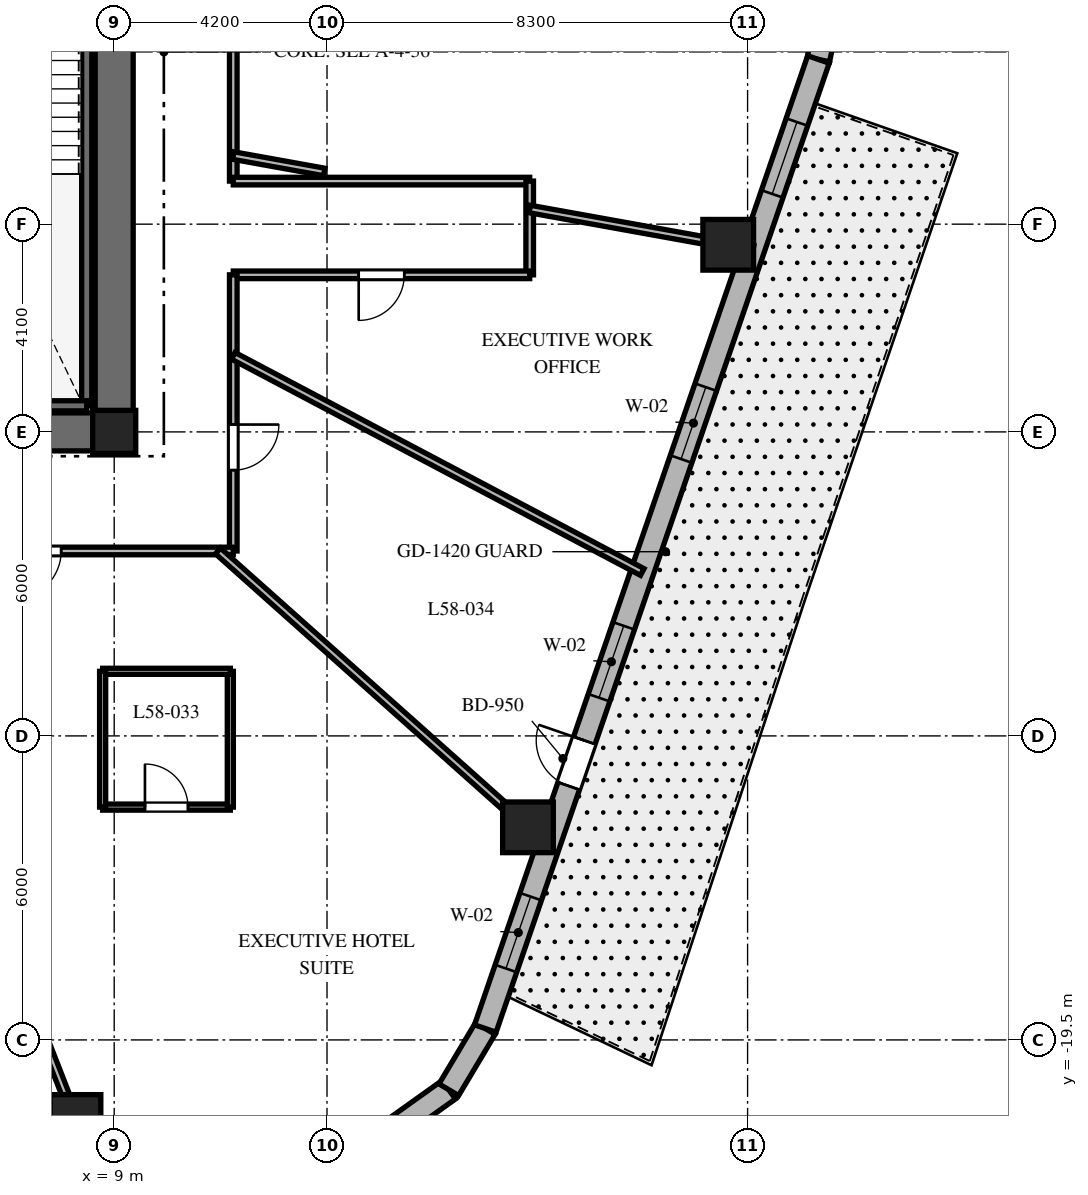
"""IFC4 building model, lengths in metres.
Left out: names, types, materials, properties, quantities, classifications, styles, units other than length and angle.
Written with IfcOpenShell. Run it as: python <this file> out.ifc"""

import sys

from ifc_helpers import new_model, si_unit, direction, frame, frame_2d, origin, origin_2d, place, context, subcontext, project, spatial, rectangle, extrude, element, fill, save


model = new_model("IFC4")
c1 = context("Model", 3, precision=1e-05, world=origin(), true_north=direction((0.0, 1.0)))
c2 = subcontext(c1, "Body", "Model", "MODEL_VIEW")
j1 = project(units=[si_unit("LENGTHUNIT", "METRE"), si_unit("PLANEANGLEUNIT", "RADIAN")], contexts=[c1])
p1 = place(None, origin())
s1 = spatial("IfcSite", under=j1, at=p1, CompositionType="ELEMENT")
p2 = place(p1, origin())
s2 = spatial("IfcBuilding", under=s1, at=p2, CompositionType="ELEMENT")
p3 = place(p2, frame((0.0, 0.0, 233.1)))
s3 = spatial("IfcBuildingStorey", under=s2, at=p3, CompositionType="ELEMENT", Elevation=233.1)
p4 = place(p3, frame((-9.375, -7.5, 0.0), z_axis=(0.0, 0.0, 1.0), x_axis=(1.0, 0.0, 0.0)))
e1 = element("IfcWall", 1, at=p4, inside=s3, PredefinedType="SHEAR", context=c2, shape_type="SweptSolid", body=[
    extrude(rectangle(XDim=18.75, YDim=0.75, at=frame_2d((9.375, 0.0))), origin(), (0.0, 0.0, 1.0), 3.8),
])
p5 = place(p4, frame((9.425, 0.0, 0.0)))
e2 = element("IfcOpeningElement", 2, at=p5, cuts=e1, PredefinedType="OPENING", context=c2, shape_type="SweptSolid", body=[
    extrude(rectangle(XDim=1.0, YDim=2.15, at=frame_2d((0.5, 1.075))), frame((0.0, 0.385, 0.0), z_axis=(0.0, -1.0, 0.0), x_axis=(1.0, 0.0, 0.0)), (0.0, 0.0, 1.0), 0.77),
])
p6 = place(p3, frame((9.0, -7.125, 0.0), z_axis=(0.0, 0.0, 1.0), x_axis=(0.0, 1.0, 0.0)))
e3 = element("IfcWall", 3, at=p6, inside=s3, PredefinedType="SHEAR", context=c2, shape_type="SweptSolid", body=[
    extrude(rectangle(XDim=14.25, YDim=0.75, at=frame_2d((7.125, 0.0))), origin(), (0.0, 0.0, 1.0), 3.8),
])
p7 = place(p6, frame((10.25, 0.0, 0.0)))
e4 = element("IfcOpeningElement", 4, at=p7, cuts=e3, PredefinedType="OPENING", context=c2, shape_type="SweptSolid", body=[
    extrude(rectangle(XDim=1.05, YDim=2.15, at=frame_2d((0.525, 1.075))), frame((0.0, 0.385, 0.0), z_axis=(0.0, -1.0, 0.0), x_axis=(1.0, 0.0, 0.0)), (0.0, 0.0, 1.0), 0.77),
])
p8 = place(p3, frame((8.458, -6.985, 0.0), z_axis=(0.0, 0.0, 1.0), x_axis=(0.0, 1.0, 0.0)))
e5 = element("IfcWall", 5, at=p8, inside=s3, PredefinedType="SHEAR", context=c2, shape_type="SweptSolid", body=[
    extrude(rectangle(XDim=9.143, YDim=0.2, at=frame_2d((4.572, 0.0))), origin(), (0.0, 0.0, 1.0), 3.8),
])
p9 = place(p3, frame((4.772, -6.985, 0.0), z_axis=(0.0, 0.0, 1.0), x_axis=(1.0, 0.0, 0.0)))
e6 = element("IfcWall", 6, at=p9, inside=s3, PredefinedType="SHEAR", context=c2, shape_type="SweptSolid", body=[
    extrude(rectangle(XDim=3.686, YDim=0.2, at=frame_2d((1.843, 0.0))), origin(), (0.0, 0.0, 1.0), 3.8),
])
p10 = place(p3, frame((9.0, -7.5, 0.0), z_axis=(0.0, 0.0, 1.0), x_axis=(1.0, 0.0, 0.0)))
e7 = element("IfcColumn", 7, at=p10, inside=s3, PredefinedType="COLUMN", context=c2, shape_type="SweptSolid", body=[
    extrude(rectangle(XDim=0.85, YDim=0.85, at=origin_2d()), origin(), (0.0, 0.0, 1.0), 3.8),
])
for number, where, z_axis, x_axis in (
    (8, (8.236, -21.08, 0.0), (0.0, 0.0, 1.0), (1.0, 0.0, 0.0)),
    (9, (17.166, -15.304, 0.0), (0.0, 0.0, 1.0), (1.0, 0.0, 0.0)),
    (10, (21.118, -3.807, 0.0), (0.0, 0.0, 1.0), (1.0, 0.0, 0.0)),
):
    element("IfcColumn", number, at=place(p3, frame(where, z_axis=z_axis, x_axis=x_axis)), inside=s3, PredefinedType="COLUMN", context=c2, shape_type="SweptSolid", body=[
        extrude(rectangle(XDim=1.0, YDim=1.0, at=origin_2d()), origin(), (0.0, 0.0, 1.0), 3.8),
    ])
p11 = place(p3, frame((14.478, -21.287, 0.0), z_axis=(0.0, 0.0, 1.0), x_axis=(0.813888518617, 0.58102106611, 0.0)))
e11 = element("IfcWall", 11, at=p11, inside=s3, PredefinedType="SOLIDWALL", context=c2, shape_type="SweptSolid", body=[
    extrude(rectangle(XDim=1.383, YDim=0.45, at=frame_2d((0.691, 0.0))), origin(), (0.0, 0.0, 1.0), 3.5),
])
p12 = place(p3, frame((15.604, -20.483, 0.0), z_axis=(0.0, 0.0, 1.0), x_axis=(0.512222149036, 0.858852996756, 0.0)))
e12 = element("IfcWall", 12, at=p12, inside=s3, PredefinedType="SOLIDWALL", context=c2, shape_type="SweptSolid", body=[
    extrude(rectangle(XDim=1.406, YDim=0.45, at=frame_2d((0.703, 0.0))), origin(), (0.0, 0.0, 1.0), 3.5),
])
p13 = place(p3, frame((22.898, -0.15, 0.0), z_axis=(0.0, 0.0, 1.0), x_axis=(0.199055826889, 0.979988151858, 0.0)))
e13 = element("IfcWall", 13, at=p13, inside=s3, PredefinedType="SOLIDWALL", context=c2, shape_type="SweptSolid", body=[
    extrude(rectangle(XDim=0.894, YDim=0.45, at=frame_2d((0.447, 0.0))), origin(), (0.0, 0.0, 1.0), 3.5),
])
p14 = place(p3, frame((16.324, -19.275, 0.0), z_axis=(0.0, 0.0, 1.0), x_axis=(0.325083142304, 0.945685439557, 0.0)))
e14 = element("IfcWall", 14, at=p14, inside=s3, PredefinedType="SOLIDWALL", context=c2, shape_type="SweptSolid", body=[
    extrude(rectangle(XDim=20.224, YDim=0.45, at=frame_2d((10.112, 0.0))), origin(), (0.0, 0.0, 1.0), 3.5),
])
p15 = place(p14, frame((5.062, 0.0, 0.0)))
e15 = element("IfcOpeningElement", 15, at=p15, cuts=e14, PredefinedType="OPENING", context=c2, shape_type="SweptSolid", body=[
    extrude(rectangle(XDim=0.95, YDim=2.15, at=frame_2d((0.475, 1.075))), frame((0.0, 0.235, 0.0), z_axis=(0.0, -1.0, 0.0), x_axis=(1.0, 0.0, 0.0)), (0.0, 0.0, 1.0), 0.47),
])
p16 = place(p14, frame((1.253, 0.0, 0.8)))
e16 = element("IfcOpeningElement", 16, at=p16, cuts=e14, PredefinedType="OPENING", context=c2, shape_type="SweptSolid", body=[
    extrude(rectangle(XDim=1.5, YDim=1.8, at=frame_2d((0.75, 0.9))), frame((0.0, 0.235, 0.0), z_axis=(0.0, -1.0, 0.0), x_axis=(1.0, 0.0, 0.0)), (0.0, 0.0, 1.0), 0.47),
])
p17 = place(p14, frame((6.904, 0.0, 0.8)))
e17 = element("IfcOpeningElement", 17, at=p17, cuts=e14, PredefinedType="OPENING", context=c2, shape_type="SweptSolid", body=[
    extrude(rectangle(XDim=1.5, YDim=1.8, at=frame_2d((0.75, 0.9))), frame((0.0, 0.235, 0.0), z_axis=(0.0, -1.0, 0.0), x_axis=(1.0, 0.0, 0.0)), (0.0, 0.0, 1.0), 0.47),
])
p18 = place(p14, frame((11.885, 0.0, 0.8)))
e18 = element("IfcOpeningElement", 18, at=p18, cuts=e14, PredefinedType="OPENING", context=c2, shape_type="SweptSolid", body=[
    extrude(rectangle(XDim=1.5, YDim=1.8, at=frame_2d((0.75, 0.9))), frame((0.0, 0.235, 0.0), z_axis=(0.0, -1.0, 0.0), x_axis=(1.0, 0.0, 0.0)), (0.0, 0.0, 1.0), 0.47),
])
p19 = place(p14, frame((17.418, 0.0, 0.8)))
e19 = element("IfcOpeningElement", 19, at=p19, cuts=e14, PredefinedType="OPENING", context=c2, shape_type="SweptSolid", body=[
    extrude(rectangle(XDim=1.5, YDim=1.8, at=frame_2d((0.75, 0.9))), frame((0.0, 0.235, 0.0), z_axis=(0.0, -1.0, 0.0), x_axis=(1.0, 0.0, 0.0)), (0.0, 0.0, 1.0), 0.47),
])
p20 = place(p3, frame((11.35, 9.85, 0.0), z_axis=(0.0, 0.0, 1.0), x_axis=(0.0, -1.0, 0.0)))
e20 = element("IfcWall", 20, at=p20, inside=s3, PredefinedType="PARTITIONING", context=c2, shape_type="SweptSolid", body=[
    extrude(rectangle(XDim=12.4, YDim=0.15, at=frame_2d((6.2, 0.0))), origin(), (0.0, 0.0, 1.0), 2.99),
])
p21 = place(p20, frame((4.191, 0.0, 0.0)))
e21 = element("IfcOpeningElement", 21, at=p21, cuts=e20, PredefinedType="OPENING", context=c2, shape_type="SweptSolid", body=[
    extrude(rectangle(XDim=0.95, YDim=2.03, at=frame_2d((0.475, 1.015))), frame((0.0, 0.085, 0.0), z_axis=(0.0, -1.0, 0.0), x_axis=(1.0, 0.0, 0.0)), (0.0, 0.0, 1.0), 0.17),
])
p22 = place(p20, frame((0.994, 0.0, 0.0)))
e22 = element("IfcOpeningElement", 22, at=p22, cuts=e20, PredefinedType="OPENING", context=c2, shape_type="SweptSolid", body=[
    extrude(rectangle(XDim=0.9, YDim=2.03, at=frame_2d((0.45, 1.015))), frame((0.0, 0.085, 0.0), z_axis=(0.0, -1.0, 0.0), x_axis=(1.0, 0.0, 0.0)), (0.0, 0.0, 1.0), 0.17),
])
p23 = place(p20, frame((8.835, 0.0, 0.0)))
e23 = element("IfcOpeningElement", 23, at=p23, cuts=e20, PredefinedType="OPENING", context=c2, shape_type="SweptSolid", body=[
    extrude(rectangle(XDim=0.95, YDim=2.03, at=frame_2d((0.475, 1.015))), frame((0.0, 0.085, 0.0), z_axis=(0.0, -1.0, 0.0), x_axis=(1.0, 0.0, 0.0)), (0.0, 0.0, 1.0), 0.17),
])
p24 = place(p3, frame((11.35, -2.55, 0.0), z_axis=(0.0, 0.0, 1.0), x_axis=(1.0, 0.0, 0.0)))
e24 = element("IfcWall", 24, at=p24, inside=s3, PredefinedType="PARTITIONING", context=c2, shape_type="SweptSolid", body=[
    extrude(rectangle(XDim=5.85, YDim=0.15, at=frame_2d((2.925, 0.0))), origin(), (0.0, 0.0, 1.0), 2.94),
])
p25 = place(p3, frame((17.2, -2.55, 0.0), z_axis=(0.0, 0.0, 1.0), x_axis=(0.0, -1.0, 0.0)))
e25 = element("IfcWall", 25, at=p25, inside=s3, PredefinedType="PARTITIONING", context=c2, shape_type="SweptSolid", body=[
    extrude(rectangle(XDim=1.85, YDim=0.15, at=frame_2d((0.925, 0.0))), origin(), (0.0, 0.0, 1.0), 2.94),
])
p26 = place(p3, frame((17.2, -4.4, 0.0), z_axis=(0.0, 0.0, 1.0), x_axis=(-1.0, 0.0, 0.0)))
e26 = element("IfcWall", 26, at=p26, inside=s3, PredefinedType="PARTITIONING", context=c2, shape_type="SweptSolid", body=[
    extrude(rectangle(XDim=5.85, YDim=0.15, at=frame_2d((2.925, 0.0))), origin(), (0.0, 0.0, 1.0), 2.94),
])
p27 = place(p26, frame((2.475, 0.0, 0.0)))
e27 = element("IfcOpeningElement", 27, at=p27, cuts=e26, PredefinedType="OPENING", context=c2, shape_type="SweptSolid", body=[
    extrude(rectangle(XDim=0.9, YDim=2.03, at=frame_2d((0.45, 1.015))), frame((0.0, 0.085, 0.0), z_axis=(0.0, -1.0, 0.0), x_axis=(1.0, 0.0, 0.0)), (0.0, 0.0, 1.0), 0.17),
])
p28 = place(p3, frame((11.35, -4.4, 0.0), z_axis=(0.0, 0.0, 1.0), x_axis=(0.0, -1.0, 0.0)))
e28 = element("IfcWall", 28, at=p28, inside=s3, PredefinedType="PARTITIONING", context=c2, shape_type="SweptSolid", body=[
    extrude(rectangle(XDim=5.45, YDim=0.15, at=frame_2d((2.725, 0.0))), origin(), (0.0, 0.0, 1.0), 2.99),
])
p29 = place(p28, frame((2.955, 0.0, 0.0)))
e29 = element("IfcOpeningElement", 29, at=p29, cuts=e28, PredefinedType="OPENING", context=c2, shape_type="SweptSolid", body=[
    extrude(rectangle(XDim=0.9, YDim=2.03, at=frame_2d((0.45, 1.015))), frame((0.0, 0.085, 0.0), z_axis=(0.0, -1.0, 0.0), x_axis=(1.0, 0.0, 0.0)), (0.0, 0.0, 1.0), 0.17),
])
p30 = place(p3, frame((11.35, -9.85, 0.0), z_axis=(0.0, 0.0, 1.0), x_axis=(-1.0, 0.0, 0.0)))
e30 = element("IfcWall", 30, at=p30, inside=s3, PredefinedType="PARTITIONING", context=c2, shape_type="SweptSolid", body=[
    extrude(rectangle(XDim=10.43, YDim=0.15, at=frame_2d((5.215, 0.0))), origin(), (0.0, 0.0, 1.0), 2.99),
])
p31 = place(p30, frame((8.362, 0.0, 0.0)))
e31 = element("IfcOpeningElement", 31, at=p31, cuts=e30, PredefinedType="OPENING", context=c2, shape_type="SweptSolid", body=[
    extrude(rectangle(XDim=0.95, YDim=2.03, at=frame_2d((0.475, 1.015))), frame((0.0, 0.085, 0.0), z_axis=(0.0, -1.0, 0.0), x_axis=(1.0, 0.0, 0.0)), (0.0, 0.0, 1.0), 0.17),
])
p32 = place(p30, frame((3.396, 0.0, 0.0)))
e32 = element("IfcOpeningElement", 32, at=p32, cuts=e30, PredefinedType="OPENING", context=c2, shape_type="SweptSolid", body=[
    extrude(rectangle(XDim=0.95, YDim=2.03, at=frame_2d((0.475, 1.015))), frame((0.0, 0.085, 0.0), z_axis=(0.0, -1.0, 0.0), x_axis=(1.0, 0.0, 0.0)), (0.0, 0.0, 1.0), 0.17),
])
p33 = place(p3, frame((3.848, -9.85, 0.0), z_axis=(0.0, 0.0, 1.0), x_axis=(0.363921778212, -0.931429513889, 0.0)))
e33 = element("IfcWall", 33, at=p33, inside=s3, PredefinedType="PARTITIONING", context=c2, shape_type="SweptSolid", body=[
    extrude(rectangle(XDim=12.588, YDim=0.15, at=frame_2d((6.294, 0.0))), origin(), (0.0, 0.0, 1.0), 2.74),
])
p34 = place(p3, frame((11.048, -9.85, 0.0), z_axis=(0.0, 0.0, 1.0), x_axis=(0.746444434655, -0.665447748492, 0.0)))
e34 = element("IfcWall", 34, at=p34, inside=s3, PredefinedType="PARTITIONING", context=c2, shape_type="SweptSolid", body=[
    extrude(rectangle(XDim=8.732, YDim=0.15, at=frame_2d((4.366, 0.0))), origin(), (0.0, 0.0, 1.0), 2.74),
])
p35 = place(p3, frame((11.35, -5.999, 0.0), z_axis=(0.0, 0.0, 1.0), x_axis=(0.884112301724, -0.467274478161, 0.0)))
e35 = element("IfcWall", 35, at=p35, inside=s3, PredefinedType="PARTITIONING", context=c2, shape_type="SweptSolid", body=[
    extrude(rectangle(XDim=9.129, YDim=0.15, at=frame_2d((4.564, 0.0))), origin(), (0.0, 0.0, 1.0), 2.74),
])
p36 = place(p3, frame((11.35, -2.046, 0.0), z_axis=(0.0, 0.0, 1.0), x_axis=(0.984127783205, -0.177461281195, 0.0)))
e36 = element("IfcWall", 36, at=p36, inside=s3, PredefinedType="PARTITIONING", context=c2, shape_type="SweptSolid", body=[
    extrude(rectangle(XDim=1.826, YDim=0.15, at=frame_2d((0.913, 0.0))), origin(), (0.0, 0.0, 1.0), 3.5),
])
p37 = place(p3, frame((17.2, -3.101, 0.0), z_axis=(0.0, 0.0, 1.0), x_axis=(0.98413465883, -0.177423147559, 0.0)))
e37 = element("IfcWall", 37, at=p37, inside=s3, PredefinedType="PARTITIONING", context=c2, shape_type="SweptSolid", body=[
    extrude(rectangle(XDim=4.482, YDim=0.15, at=frame_2d((2.241, 0.0))), origin(), (0.0, 0.0, 1.0), 2.74),
])
p38 = place(p3, frame((8.772, -14.905, 0.0), z_axis=(0.0, 0.0, 1.0), x_axis=(1.0, 0.0, 0.0)))
e38 = element("IfcWall", 38, at=p38, inside=s3, PredefinedType="PARTITIONING", context=c2, shape_type="SweptSolid", body=[
    extrude(rectangle(XDim=2.52, YDim=0.12, at=frame_2d((1.26, 0.0))), origin(), (0.0, 0.0, 1.0), 3.026),
])
p39 = place(p38, frame((0.835, 0.0, 0.0)))
e39 = element("IfcOpeningElement", 39, at=p39, cuts=e38, PredefinedType="OPENING", context=c2, shape_type="SweptSolid", body=[
    extrude(rectangle(XDim=0.85, YDim=2.03, at=frame_2d((0.425, 1.015))), frame((0.0, 0.07, 0.0), z_axis=(0.0, -1.0, 0.0), x_axis=(1.0, 0.0, 0.0)), (0.0, 0.0, 1.0), 0.14),
])
p40 = place(p3, frame((11.292, -14.905, 0.0), z_axis=(0.0, 0.0, 1.0), x_axis=(0.0, 1.0, 0.0)))
e40 = element("IfcWall", 40, at=p40, inside=s3, PredefinedType="PARTITIONING", context=c2, shape_type="SweptSolid", body=[
    extrude(rectangle(XDim=2.68, YDim=0.12, at=frame_2d((1.34, 0.0))), origin(), (0.0, 0.0, 1.0), 3.026),
])
p41 = place(p3, frame((11.292, -12.225, 0.0), z_axis=(0.0, 0.0, 1.0), x_axis=(-1.0, 0.0, 0.0)))
e41 = element("IfcWall", 41, at=p41, inside=s3, PredefinedType="PARTITIONING", context=c2, shape_type="SweptSolid", body=[
    extrude(rectangle(XDim=2.52, YDim=0.12, at=frame_2d((1.26, 0.0))), origin(), (0.0, 0.0, 1.0), 2.99),
])
p42 = place(p3, frame((8.772, -12.225, 0.0), z_axis=(0.0, 0.0, 1.0), x_axis=(0.0, -1.0, 0.0)))
e42 = element("IfcWall", 42, at=p42, inside=s3, PredefinedType="PARTITIONING", context=c2, shape_type="SweptSolid", body=[
    extrude(rectangle(XDim=2.68, YDim=0.12, at=frame_2d((1.34, 0.0))), origin(), (0.0, 0.0, 1.0), 2.99),
])
p43 = place(p15, origin())
e43 = element("IfcDoor", 43, at=p43, inside=s3, OperationType="SINGLE_SWING_RIGHT", PredefinedType="DOOR", context=c2, shape_type="SweptSolid", body=[
    extrude(rectangle(XDim=0.95, YDim=2.15, at=frame_2d((0.475, 1.075))), frame((0.0, 0.025, 0.0), z_axis=(0.0, -1.0, 0.0), x_axis=(1.0, 0.0, 0.0)), (0.0, 0.0, 1.0), 0.05),
])
fill(e15, e43)
p44 = place(p16, origin())
e44 = element("IfcWindow", 44, at=p44, inside=s3, PartitioningType="SINGLE_PANEL", PredefinedType="WINDOW", context=c2, shape_type="SweptSolid", body=[
    extrude(rectangle(XDim=1.5, YDim=1.8, at=frame_2d((0.75, 0.9))), frame((0.0, 0.03, 0.0), z_axis=(0.0, -1.0, 0.0), x_axis=(1.0, 0.0, 0.0)), (0.0, 0.0, 1.0), 0.06),
])
fill(e16, e44)
p45 = place(p17, origin())
e45 = element("IfcWindow", 45, at=p45, inside=s3, PartitioningType="SINGLE_PANEL", PredefinedType="WINDOW", context=c2, shape_type="SweptSolid", body=[
    extrude(rectangle(XDim=1.5, YDim=1.8, at=frame_2d((0.75, 0.9))), frame((0.0, 0.03, 0.0), z_axis=(0.0, -1.0, 0.0), x_axis=(1.0, 0.0, 0.0)), (0.0, 0.0, 1.0), 0.06),
])
fill(e17, e45)
p46 = place(p18, origin())
e46 = element("IfcWindow", 46, at=p46, inside=s3, PartitioningType="SINGLE_PANEL", PredefinedType="WINDOW", context=c2, shape_type="SweptSolid", body=[
    extrude(rectangle(XDim=1.5, YDim=1.8, at=frame_2d((0.75, 0.9))), frame((0.0, 0.03, 0.0), z_axis=(0.0, -1.0, 0.0), x_axis=(1.0, 0.0, 0.0)), (0.0, 0.0, 1.0), 0.06),
])
fill(e18, e46)
p47 = place(p19, origin())
e47 = element("IfcWindow", 47, at=p47, inside=s3, PartitioningType="SINGLE_PANEL", PredefinedType="WINDOW", context=c2, shape_type="SweptSolid", body=[
    extrude(rectangle(XDim=1.5, YDim=1.8, at=frame_2d((0.75, 0.9))), frame((0.0, 0.03, 0.0), z_axis=(0.0, -1.0, 0.0), x_axis=(1.0, 0.0, 0.0)), (0.0, 0.0, 1.0), 0.06),
])
fill(e19, e47)
p48 = place(p32, origin())
e48 = element("IfcDoor", 48, at=p48, inside=s3, OperationType="SINGLE_SWING_RIGHT", PredefinedType="DOOR", context=c2, shape_type="SweptSolid", body=[
    extrude(rectangle(XDim=0.95, YDim=2.03, at=frame_2d((0.475, 1.015))), frame((0.0, 0.025, 0.0), z_axis=(0.0, -1.0, 0.0), x_axis=(1.0, 0.0, 0.0)), (0.0, 0.0, 1.0), 0.05),
])
fill(e32, e48)
p49 = place(p39, origin())
e49 = element("IfcDoor", 49, at=p49, inside=s3, OperationType="SINGLE_SWING_LEFT", PredefinedType="DOOR", context=c2, shape_type="SweptSolid", body=[
    extrude(rectangle(XDim=0.85, YDim=2.03, at=frame_2d((0.425, 1.015))), frame((0.0, 0.025, 0.0), z_axis=(0.0, -1.0, 0.0), x_axis=(1.0, 0.0, 0.0)), (0.0, 0.0, 1.0), 0.05),
])
fill(e39, e49)
p50 = place(p29, origin())
e50 = element("IfcDoor", 50, at=p50, inside=s3, OperationType="SINGLE_SWING_LEFT", PredefinedType="DOOR", context=c2, shape_type="SweptSolid", body=[
    extrude(rectangle(XDim=0.9, YDim=2.03, at=frame_2d((0.45, 1.015))), frame((0.0, 0.025, 0.0), z_axis=(0.0, -1.0, 0.0), x_axis=(1.0, 0.0, 0.0)), (0.0, 0.0, 1.0), 0.05),
])
fill(e29, e50)
p51 = place(p27, origin())
e51 = element("IfcDoor", 51, at=p51, inside=s3, OperationType="SINGLE_SWING_RIGHT", PredefinedType="DOOR", context=c2, shape_type="SweptSolid", body=[
    extrude(rectangle(XDim=0.9, YDim=2.03, at=frame_2d((0.45, 1.015))), frame((0.0, 0.025, 0.0), z_axis=(0.0, -1.0, 0.0), x_axis=(1.0, 0.0, 0.0)), (0.0, 0.0, 1.0), 0.05),
])
fill(e27, e51)
save(model, sys.argv[1])
